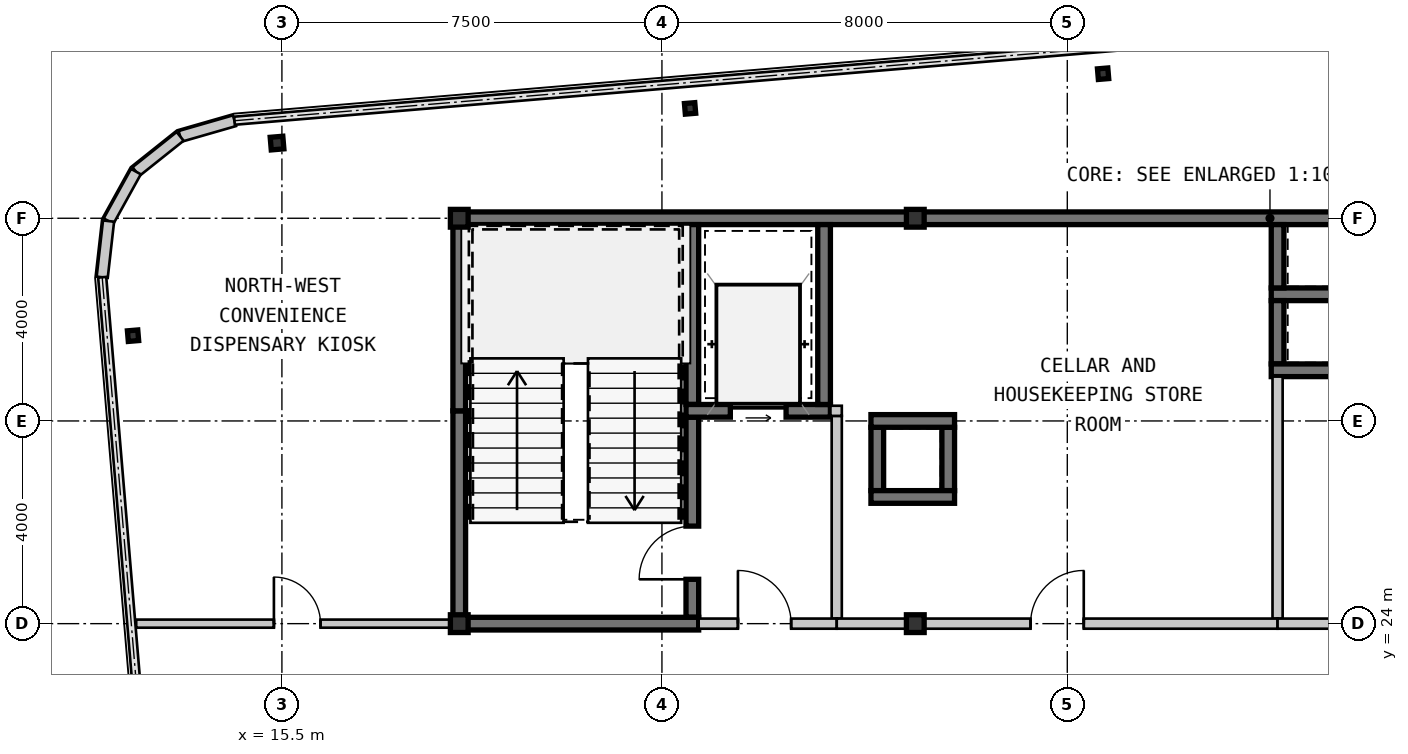
"""IFC4 building model, lengths in metres.
Left out: names, types, materials, properties, quantities, classifications, styles, units other than length and angle.
Written with IfcOpenShell. Run it as: python <this file> out.ifc"""

import sys

from ifc_helpers import new_model, si_unit, direction, frame, frame_2d, origin, origin_2d, place, context, subcontext, project, spatial, rectangle, hollow_rectangle, i_section, extrude, source, transform, mapped, element, fill, save


model = new_model("IFC4")
c1 = context("Model", 3, precision=1e-05, world=origin(), true_north=direction((0.0, 1.0)))
c2 = subcontext(c1, "Body", "Model", "MODEL_VIEW")
j1 = project(units=[si_unit("LENGTHUNIT", "METRE"), si_unit("PLANEANGLEUNIT", "RADIAN")], contexts=[c1])
p1 = place(None, origin())
s1 = spatial("IfcSite", under=j1, at=p1, CompositionType="ELEMENT")
p2 = place(p1, origin())
s2 = spatial("IfcBuilding", under=s1, at=p2, CompositionType="ELEMENT")
p3 = place(p2, frame((0.0, 0.0, 204.05)))
s3 = spatial("IfcBuildingStorey", under=s2, at=p3, CompositionType="ELEMENT", Elevation=204.05)
m1 = source(origin(), c2, "Body", "SweptSolid", [
    extrude(hollow_rectangle(XDim=0.35, YDim=0.35, WallThickness=0.016, at=origin_2d()), origin(), (0.0, 0.0, 1.0), 3.15),
])
for number, where, z_axis, x_axis in (
    (1, (19.0, 24.0, 0.0), (0.0, 0.0, 1.0), (1.0, 0.0, 0.0)),
    (2, (28.0, 24.0, 0.0), (0.0, 0.0, 1.0), (1.0, 0.0, 0.0)),
    (3, (19.0, 32.0, 0.0), (0.0, 0.0, 1.0), (1.0, 0.0, 0.0)),
    (4, (28.0, 32.0, 0.0), (0.0, 0.0, 1.0), (1.0, 0.0, 0.0)),
):
    element("IfcColumn", number, at=place(p3, frame(where, z_axis=z_axis, x_axis=x_axis)), inside=s3, PredefinedType="COLUMN", context=c2, shape_type="MappedRepresentation", body=[
        mapped(m1, transform((0.0, 0.0, 0.0), scale=1.0)),
    ])
m2 = source(origin(), c2, "Body", "SweptSolid", [
    extrude(hollow_rectangle(XDim=0.25, YDim=0.25, WallThickness=0.01, at=origin_2d()), origin(), (0.0, 0.0, 1.0), 3.15),
])
p4 = place(p3, frame((15.404, 33.484, 0.0), z_axis=(0.0, 0.0, 1.0), x_axis=(0.99649285925, 0.083677843332, 0.0)))
e5 = element("IfcColumn", 5, at=p4, inside=s3, PredefinedType="COLUMN", context=c2, shape_type="MappedRepresentation", body=[
    mapped(m2, transform((0.0, 0.0, 0.0), scale=1.0)),
])
m3 = source(origin(), c2, "Body", "SweptSolid", [
    extrude(i_section(OverallWidth=0.205, OverallDepth=0.21, WebThickness=0.009, FlangeThickness=0.014, at=origin_2d()), origin(), (0.0, 0.0, 1.0), 3.15),
])
for number, where, z_axis, x_axis in (
    (6, (23.555, 34.168, 0.0), (0.0, 0.0, 1.0), (0.996, 0.084, 0.0)),
    (7, (31.706, 34.853, 0.0), (0.0, 0.0, 1.0), (0.996, 0.084, 0.0)),
    (8, (12.562, 29.682, 0.0), (0.0, 0.0, 1.0), (0.996, 0.084, 0.0)),
):
    element("IfcColumn", number, at=place(p3, frame(where, z_axis=z_axis, x_axis=x_axis)), inside=s3, PredefinedType="COLUMN", context=c2, shape_type="MappedRepresentation", body=[
        mapped(m3, transform((0.0, 0.0, 0.0), scale=1.0)),
    ])
m4 = source(origin(), c2, "Body", "SweptSolid", [
    extrude(rectangle(XDim=1.116, YDim=0.22, at=frame_2d((0.558, 0.0))), origin(), (0.0, 0.0, 1.0), 2.87),
])
p5 = place(p3, frame((14.564, 33.925, 0.0), z_axis=(0.0, 0.0, 1.0), x_axis=(-0.961010464297, -0.276512002475, 0.0)))
e9 = element("IfcWall", 9, at=p5, inside=s3, PredefinedType="SOLIDWALL", context=c2, shape_type="MappedRepresentation", body=[
    mapped(m4, transform((0.0, 0.0, 0.0), scale=1.0)),
])
m5 = source(origin(), c2, "Body", "SweptSolid", [
    extrude(rectangle(XDim=1.116, YDim=0.22, at=frame_2d((0.558, 0.0))), origin(), (0.0, 0.0, 1.0), 2.87),
])
p6 = place(p3, frame((13.491, 33.616, 0.0), z_axis=(0.0, 0.0, 1.0), x_axis=(-0.782062884215, -0.623199522732, 0.0)))
e10 = element("IfcWall", 10, at=p6, inside=s3, PredefinedType="SOLIDWALL", context=c2, shape_type="MappedRepresentation", body=[
    mapped(m5, transform((0.0, 0.0, 0.0), scale=1.0)),
])
for number, where, z_axis, x_axis in (
    (11, (12.619, 32.921, 0.0), (0.0, 0.0, 1.0), (-0.484, -0.875, 0.0)),
    (12, (12.079, 31.944, 0.0), (0.0, 0.0, 1.0), (-0.112, -0.994, 0.0)),
):
    element("IfcWall", number, at=place(p3, frame(where, z_axis=z_axis, x_axis=x_axis)), inside=s3, PredefinedType="SOLIDWALL", context=c2, shape_type="MappedRepresentation", body=[
        mapped(m4, transform((0.0, 0.0, 0.0), scale=1.0)),
    ])
m6 = source(origin(), c2, "Body", "SweptSolid", [
    extrude(rectangle(XDim=9.125, YDim=0.25, at=frame_2d((4.562, 0.0))), origin(), (0.0, 0.0, 1.0), 2.87),
])
p7 = place(p3, frame((18.875, 32.0, 0.0), z_axis=(0.0, 0.0, 1.0), x_axis=(1.0, 0.0, 0.0)))
e13 = element("IfcWall", 13, at=p7, inside=s3, PredefinedType="SHEAR", context=c2, shape_type="MappedRepresentation", body=[
    mapped(m6, transform((0.0, 0.0, 0.0), scale=1.0)),
])
m7 = source(origin(), c2, "Body", "SweptSolid", [
    extrude(rectangle(XDim=11.2, YDim=0.25, at=frame_2d((5.6, 0.0))), origin(), (0.0, 0.0, 1.0), 2.87),
])
p8 = place(p3, frame((28.0, 32.0, 0.0), z_axis=(0.0, 0.0, 1.0), x_axis=(1.0, 0.0, 0.0)))
e14 = element("IfcWall", 14, at=p8, inside=s3, PredefinedType="SHEAR", context=c2, shape_type="MappedRepresentation", body=[
    mapped(m7, transform((0.0, 0.0, 0.0), scale=1.0)),
])
m8 = source(origin(), c2, "Body", "SweptSolid", [
    extrude(rectangle(XDim=4.075, YDim=0.25, at=frame_2d((2.038, 0.0))), origin(), (0.0, 0.0, 1.0), 2.87),
])
p9 = place(p3, frame((19.0, 24.125, 0.0), z_axis=(0.0, 0.0, 1.0), x_axis=(0.0, 1.0, 0.0)))
e15 = element("IfcWall", 15, at=p9, inside=s3, PredefinedType="SHEAR", context=c2, shape_type="MappedRepresentation", body=[
    mapped(m8, transform((0.0, 0.0, 0.0), scale=1.0)),
])
m9 = source(origin(), c2, "Body", "SweptSolid", [
    extrude(rectangle(XDim=3.675, YDim=0.25, at=frame_2d((1.837, 0.0))), origin(), (0.0, 0.0, 1.0), 2.87),
])
p10 = place(p3, frame((19.0, 28.2, 0.0), z_axis=(0.0, 0.0, 1.0), x_axis=(0.0, 1.0, 0.0)))
e16 = element("IfcWall", 16, at=p10, inside=s3, PredefinedType="SHEAR", context=c2, shape_type="MappedRepresentation", body=[
    mapped(m9, transform((0.0, 0.0, 0.0), scale=1.0)),
])
m10 = source(origin(), c2, "Body", "SweptSolid", [
    extrude(rectangle(XDim=3.55, YDim=0.25, at=frame_2d((1.775, 0.0))), origin(), (0.0, 0.0, 1.0), 2.87),
])
p11 = place(p3, frame((23.6, 28.325, 0.0), z_axis=(0.0, 0.0, 1.0), x_axis=(0.0, 1.0, 0.0)))
e17 = element("IfcWall", 17, at=p11, inside=s3, PredefinedType="SHEAR", context=c2, shape_type="MappedRepresentation", body=[
    mapped(m10, transform((0.0, 0.0, 0.0), scale=1.0)),
])
m11 = source(origin(), c2, "Body", "SweptSolid", [
    extrude(rectangle(XDim=3.95, YDim=0.25, at=frame_2d((1.975, 0.0))), origin(), (0.0, 0.0, 1.0), 2.87),
])
p12 = place(p3, frame((23.6, 24.125, 0.0), z_axis=(0.0, 0.0, 1.0), x_axis=(0.0, 1.0, 0.0)))
e18 = element("IfcWall", 18, at=p12, inside=s3, PredefinedType="SHEAR", context=c2, shape_type="MappedRepresentation", body=[
    mapped(m11, transform((0.0, 0.0, 0.0), scale=1.0)),
])
m12 = source(origin(), c2, "Body", "SweptSolid", [
    extrude(rectangle(XDim=1.05, YDim=2.1, at=frame_2d((0.525, 1.05))), frame((0.0, 0.135, 0.0), z_axis=(0.0, -1.0, 0.0), x_axis=(1.0, 0.0, 0.0)), (0.0, 0.0, 1.0), 0.27),
])
p13 = place(p12, frame((0.75, 0.0, 0.0)))
e19 = element("IfcOpeningElement", 19, at=p13, cuts=e18, PredefinedType="OPENING", context=c2, shape_type="MappedRepresentation", body=[
    mapped(m12, transform((0.0, 0.0, 0.0), scale=1.0)),
])
m13 = source(origin(), c2, "Body", "SweptSolid", [
    extrude(rectangle(XDim=4.85, YDim=0.25, at=frame_2d((2.425, 0.0))), origin(), (0.0, 0.0, 1.0), 2.87),
])
p14 = place(p3, frame((18.875, 24.0, 0.0), z_axis=(0.0, 0.0, 1.0), x_axis=(1.0, 0.0, 0.0)))
e20 = element("IfcWall", 20, at=p14, inside=s3, PredefinedType="SHEAR", context=c2, shape_type="MappedRepresentation", body=[
    mapped(m13, transform((0.0, 0.0, 0.0), scale=1.0)),
])
m14 = source(origin(), c2, "Body", "SweptSolid", [
    extrude(rectangle(XDim=2.85, YDim=0.25, at=frame_2d((1.425, 0.0))), origin(), (0.0, 0.0, 1.0), 2.87),
])
p15 = place(p3, frame((23.475, 28.2, 0.0), z_axis=(0.0, 0.0, 1.0), x_axis=(1.0, 0.0, 0.0)))
e21 = element("IfcWall", 21, at=p15, inside=s3, PredefinedType="SHEAR", context=c2, shape_type="MappedRepresentation", body=[
    mapped(m14, transform((0.0, 0.0, 0.0), scale=1.0)),
])
m15 = source(origin(), c2, "Body", "SweptSolid", [
    extrude(rectangle(XDim=1.1, YDim=2.15, at=frame_2d((0.55, 1.075))), frame((0.0, 0.135, 0.0), z_axis=(0.0, -1.0, 0.0), x_axis=(1.0, 0.0, 0.0)), (0.0, 0.0, 1.0), 0.27),
])
p16 = place(p15, frame((0.875, 0.0, 0.0)))
e22 = element("IfcOpeningElement", 22, at=p16, cuts=e21, PredefinedType="OPENING", context=c2, shape_type="MappedRepresentation", body=[
    mapped(m15, transform((0.0, 0.0, 0.0), scale=1.0)),
])
p17 = place(p3, frame((26.2, 28.325, 0.0), z_axis=(0.0, 0.0, 1.0), x_axis=(0.0, 1.0, 0.0)))
e23 = element("IfcWall", 23, at=p17, inside=s3, PredefinedType="SHEAR", context=c2, shape_type="MappedRepresentation", body=[
    mapped(m10, transform((0.0, 0.0, 0.0), scale=1.0)),
])
m16 = source(origin(), c2, "Body", "SweptSolid", [
    extrude(rectangle(XDim=4.0, YDim=0.2, at=frame_2d((2.0, 0.0))), origin(), (0.0, 0.0, 1.0), 2.87),
])
p18 = place(p3, frame((26.45, 24.1, 0.0), z_axis=(0.0, 0.0, 1.0), x_axis=(0.0, 1.0, 0.0)))
e24 = element("IfcWall", 24, at=p18, inside=s3, PredefinedType="SOLIDWALL", context=c2, shape_type="MappedRepresentation", body=[
    mapped(m16, transform((0.0, 0.0, 0.0), scale=1.0)),
])
m17 = source(origin(), c2, "Body", "SweptSolid", [
    extrude(rectangle(XDim=2.725, YDim=0.2, at=frame_2d((1.362, 0.0))), origin(), (0.0, 0.0, 1.0), 2.41),
])
p19 = place(p3, frame((23.725, 24.0, 0.0), z_axis=(0.0, 0.0, 1.0), x_axis=(1.0, 0.0, 0.0)))
e25 = element("IfcWall", 25, at=p19, inside=s3, PredefinedType="SOLIDWALL", context=c2, shape_type="MappedRepresentation", body=[
    mapped(m17, transform((0.0, 0.0, 0.0), scale=1.0)),
])
m18 = source(origin(), c2, "Body", "SweptSolid", [
    extrude(rectangle(XDim=1.05, YDim=2.1, at=frame_2d((0.525, 1.05))), frame((0.0, 0.11, 0.0), z_axis=(0.0, -1.0, 0.0), x_axis=(1.0, 0.0, 0.0)), (0.0, 0.0, 1.0), 0.22),
])
p20 = place(p19, frame((0.775, 0.0, 0.0)))
e26 = element("IfcOpeningElement", 26, at=p20, cuts=e25, PredefinedType="OPENING", context=c2, shape_type="MappedRepresentation", body=[
    mapped(m18, transform((0.0, 0.0, 0.0), scale=1.0)),
])
m19 = source(origin(), c2, "Body", "SweptSolid", [
    extrude(rectangle(XDim=1.95, YDim=0.25, at=frame_2d((0.975, 0.0))), origin(), (0.0, 0.0, 1.0), 2.87),
])
p21 = place(p3, frame((35.025, 30.5, 0.0), z_axis=(0.0, 0.0, 1.0), x_axis=(1.0, 0.0, 0.0)))
e27 = element("IfcWall", 27, at=p21, inside=s3, PredefinedType="SHEAR", context=c2, shape_type="MappedRepresentation", body=[
    mapped(m19, transform((0.0, 0.0, 0.0), scale=1.0)),
])
m20 = source(origin(), c2, "Body", "SweptSolid", [
    extrude(rectangle(XDim=1.25, YDim=0.25, at=frame_2d((0.625, 0.0))), origin(), (0.0, 0.0, 1.0), 2.87),
])
for number, where, z_axis, x_axis in (
    (28, (35.15, 31.875, 0.0), (0.0, 0.0, 1.0), (0.0, -1.0, 0.0)),
    (29, (35.15, 30.375, 0.0), (0.0, 0.0, 1.0), (0.0, -1.0, 0.0)),
):
    element("IfcWall", number, at=place(p3, frame(where, z_axis=z_axis, x_axis=x_axis)), inside=s3, PredefinedType="SHEAR", context=c2, shape_type="MappedRepresentation", body=[
        mapped(m20, transform((0.0, 0.0, 0.0), scale=1.0)),
    ])
p22 = place(p3, frame((35.025, 29.0, 0.0), z_axis=(0.0, 0.0, 1.0), x_axis=(1.0, 0.0, 0.0)))
e30 = element("IfcWall", 30, at=p22, inside=s3, PredefinedType="SHEAR", context=c2, shape_type="MappedRepresentation", body=[
    mapped(m19, transform((0.0, 0.0, 0.0), scale=1.0)),
])
for number, where, z_axis, x_axis in (
    (31, (28.65, 26.625, 0.0), (0.0, 0.0, 1.0), (0.0, 1.0, 0.0)),
    (32, (27.25, 27.875, 0.0), (0.0, 0.0, 1.0), (0.0, -1.0, 0.0)),
):
    element("IfcWall", number, at=place(p3, frame(where, z_axis=z_axis, x_axis=x_axis)), inside=s3, PredefinedType="SHEAR", context=c2, shape_type="MappedRepresentation", body=[
        mapped(m20, transform((0.0, 0.0, 0.0), scale=1.0)),
    ])
m21 = source(origin(), c2, "Body", "SweptSolid", [
    extrude(rectangle(XDim=1.65, YDim=0.25, at=frame_2d((0.825, 0.0))), origin(), (0.0, 0.0, 1.0), 2.87),
])
for number, where, z_axis, x_axis in (
    (33, (28.775, 28.0, 0.0), (0.0, 0.0, 1.0), (-1.0, 0.0, 0.0)),
    (34, (27.125, 26.5, 0.0), (0.0, 0.0, 1.0), (1.0, 0.0, 0.0)),
):
    element("IfcWall", number, at=place(p3, frame(where, z_axis=z_axis, x_axis=x_axis)), inside=s3, PredefinedType="SHEAR", context=c2, shape_type="MappedRepresentation", body=[
        mapped(m21, transform((0.0, 0.0, 0.0), scale=1.0)),
    ])
m22 = source(origin(), c2, "Body", "SweptSolid", [
    extrude(rectangle(XDim=4.775, YDim=0.2, at=frame_2d((2.387, 0.0))), origin(), (0.0, 0.0, 1.0), 2.87),
])
p23 = place(p3, frame((35.15, 28.875, 0.0), z_axis=(0.0, 0.0, 1.0), x_axis=(0.0, -1.0, 0.0)))
e35 = element("IfcWall", 35, at=p23, inside=s3, PredefinedType="SOLIDWALL", context=c2, shape_type="MappedRepresentation", body=[
    mapped(m22, transform((0.0, 0.0, 0.0), scale=1.0)),
])
m23 = source(origin(), c2, "Body", "SweptSolid", [
    extrude(rectangle(XDim=8.7, YDim=0.2, at=frame_2d((4.35, 0.0))), origin(), (0.0, 0.0, 1.0), 2.41),
])
p24 = place(p3, frame((35.15, 24.0, 0.0), z_axis=(0.0, 0.0, 1.0), x_axis=(-1.0, 0.0, 0.0)))
e36 = element("IfcWall", 36, at=p24, inside=s3, PredefinedType="SOLIDWALL", context=c2, shape_type="MappedRepresentation", body=[
    mapped(m23, transform((0.0, 0.0, 0.0), scale=1.0)),
])
p25 = place(p24, frame((3.825, 0.0, 0.0)))
e37 = element("IfcOpeningElement", 37, at=p25, cuts=e36, PredefinedType="OPENING", context=c2, shape_type="MappedRepresentation", body=[
    mapped(m18, transform((0.0, 0.0, 0.0), scale=1.0)),
])
m24 = source(origin(), c2, "Body", "SweptSolid", [
    extrude(rectangle(XDim=4.05, YDim=0.2, at=frame_2d((2.025, 0.0))), origin(), (0.0, 0.0, 1.0), 2.41),
])
p26 = place(p3, frame((39.2, 24.0, 0.0), z_axis=(0.0, 0.0, 1.0), x_axis=(-1.0, 0.0, 0.0)))
e38 = element("IfcWall", 38, at=p26, inside=s3, PredefinedType="SOLIDWALL", context=c2, shape_type="MappedRepresentation", body=[
    mapped(m24, transform((0.0, 0.0, 0.0), scale=1.0)),
])
p27 = place(p26, frame((1.5, 0.0, 0.0)))
e39 = element("IfcOpeningElement", 39, at=p27, cuts=e38, PredefinedType="OPENING", context=c2, shape_type="MappedRepresentation", body=[
    mapped(m18, transform((0.0, 0.0, 0.0), scale=1.0)),
])
m25 = source(origin(), c2, "Body", "SweptSolid", [
    extrude(rectangle(XDim=6.251, YDim=0.16, at=frame_2d((3.125, 0.0))), origin(), (0.0, 0.0, 1.0), 2.87),
])
p28 = place(p3, frame((12.624, 24.0, 0.0), z_axis=(0.0, 0.0, 1.0), x_axis=(1.0, 0.0, 0.0)))
e40 = element("IfcWall", 40, at=p28, inside=s3, PredefinedType="PARTITIONING", context=c2, shape_type="MappedRepresentation", body=[
    mapped(m25, transform((0.0, 0.0, 0.0), scale=1.0)),
])
m26 = source(origin(), c2, "Body", "SweptSolid", [
    extrude(rectangle(XDim=0.92, YDim=2.1, at=frame_2d((0.46, 1.05))), frame((0.0, 0.09, 0.0), z_axis=(0.0, -1.0, 0.0), x_axis=(1.0, 0.0, 0.0)), (0.0, 0.0, 1.0), 0.18),
])
p29 = place(p28, frame((2.718, 0.0, 0.0)))
e41 = element("IfcOpeningElement", 41, at=p29, cuts=e40, PredefinedType="OPENING", context=c2, shape_type="MappedRepresentation", body=[
    mapped(m26, transform((0.0, 0.0, 0.0), scale=1.0)),
])
m27 = source(origin(), c2, "Body", "SweptSolid", [
    extrude(rectangle(XDim=0.225, YDim=0.2, at=frame_2d((0.113, 0.0))), origin(), (0.0, 0.0, 1.0), 2.87),
])
p30 = place(p3, frame((26.325, 28.2, 0.0), z_axis=(0.0, 0.0, 1.0), x_axis=(1.0, 0.0, 0.0)))
e42 = element("IfcWall", 42, at=p30, inside=s3, PredefinedType="SOLIDWALL", context=c2, shape_type="MappedRepresentation", body=[
    mapped(m27, transform((0.0, 0.0, 0.0), scale=1.0)),
])
m28 = source(origin(), c2, "Body", "SweptSolid", [
    extrude(rectangle(XDim=1.05, YDim=2.1, at=frame_2d((0.525, 1.05))), frame((0.0, 0.025, 0.0), z_axis=(0.0, -1.0, 0.0), x_axis=(1.0, 0.0, 0.0)), (0.0, 0.0, 1.0), 0.05),
])
p31 = place(p13, origin())
e43 = element("IfcDoor", 43, at=p31, inside=s3, OperationType="SINGLE_SWING_LEFT", PredefinedType="DOOR", context=c2, shape_type="MappedRepresentation", body=[
    mapped(m28, transform((0.0, 0.0, 0.0), scale=1.0)),
])
fill(e19, e43)
m29 = source(origin(), c2, "Body", "SweptSolid", [
    extrude(rectangle(XDim=1.1, YDim=2.15, at=frame_2d((0.55, 1.075))), frame((0.0, 0.025, 0.0), z_axis=(0.0, -1.0, 0.0), x_axis=(1.0, 0.0, 0.0)), (0.0, 0.0, 1.0), 0.05),
])
p32 = place(p16, origin())
e44 = element("IfcDoor", 44, at=p32, inside=s3, OperationType="SLIDING_TO_LEFT", PredefinedType="DOOR", context=c2, shape_type="MappedRepresentation", body=[
    mapped(m29, transform((0.0, 0.0, 0.0), scale=1.0)),
])
fill(e22, e44)
p33 = place(p20, origin())
e45 = element("IfcDoor", 45, at=p33, inside=s3, OperationType="SINGLE_SWING_LEFT", PredefinedType="DOOR", context=c2, shape_type="MappedRepresentation", body=[
    mapped(m28, transform((0.0, 0.0, 0.0), scale=1.0)),
])
fill(e26, e45)
p34 = place(p25, frame((1.05, 0.0, 0.0), z_axis=(0.0, 0.0, 1.0), x_axis=(-1.0, 0.0, 0.0)))
e46 = element("IfcDoor", 46, at=p34, inside=s3, OperationType="SINGLE_SWING_RIGHT", PredefinedType="DOOR", context=c2, shape_type="MappedRepresentation", body=[
    mapped(m28, transform((0.0, 0.0, 0.0), scale=1.0)),
])
fill(e37, e46)
m30 = source(origin(), c2, "Body", "SweptSolid", [
    extrude(rectangle(XDim=0.92, YDim=2.1, at=frame_2d((0.46, 1.05))), frame((0.0, 0.025, 0.0), z_axis=(0.0, -1.0, 0.0), x_axis=(1.0, 0.0, 0.0)), (0.0, 0.0, 1.0), 0.05),
])
p35 = place(p29, origin())
e47 = element("IfcDoor", 47, at=p35, inside=s3, OperationType="SINGLE_SWING_LEFT", PredefinedType="DOOR", context=c2, shape_type="MappedRepresentation", body=[
    mapped(m30, transform((0.0, 0.0, 0.0), scale=1.0)),
])
fill(e41, e47)
save(model, sys.argv[1])
